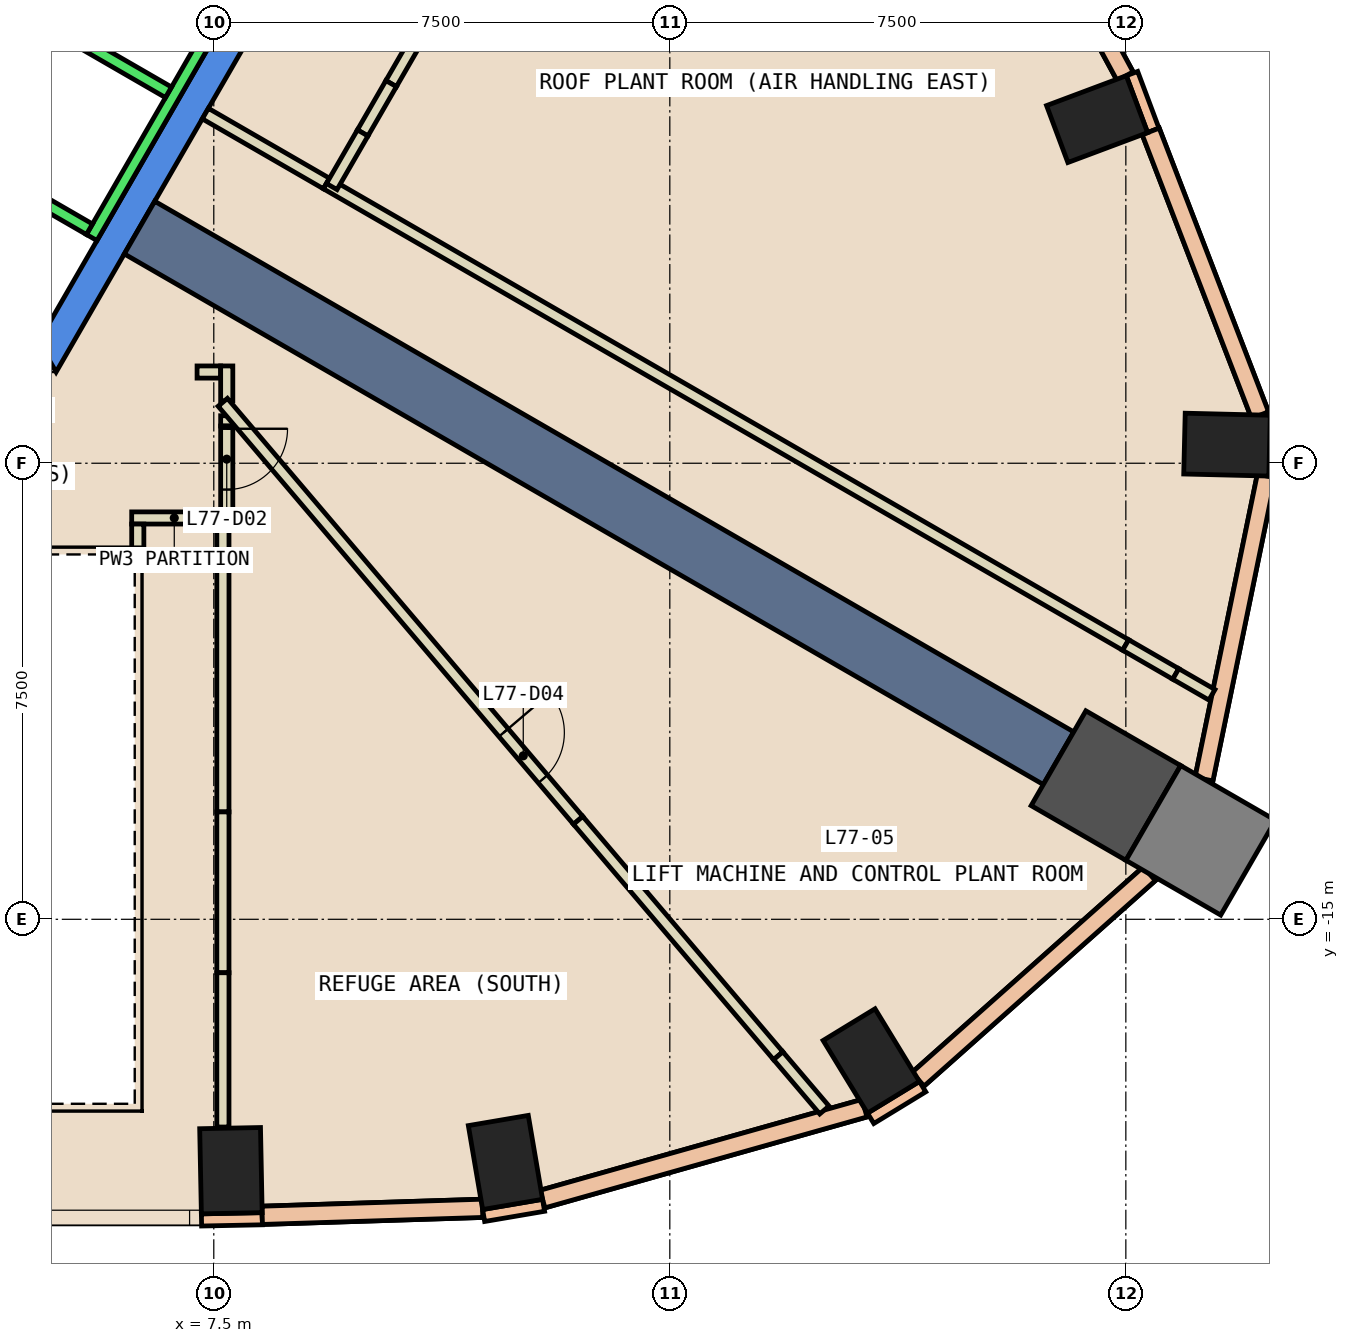
"""IFC4 building model, lengths in metres.
Left out: names, types, materials, properties, quantities, classifications, styles, units other than length and angle.
Written with IfcOpenShell. Run it as: python <this file> out.ifc"""

import sys

from ifc_helpers import new_model, si_unit, direction, frame, frame_2d, origin, origin_2d, place, context, subcontext, project, spatial, polyline, rectangle, outline, extrude, element, fill, save


model = new_model("IFC4")
c1 = context("Model", 3, precision=1e-05, world=origin(), true_north=direction((0.0, 1.0)))
c2 = subcontext(c1, "Body", "Model", "MODEL_VIEW")
j1 = project(units=[si_unit("LENGTHUNIT", "METRE"), si_unit("PLANEANGLEUNIT", "RADIAN")], contexts=[c1])
p1 = place(None, origin())
s1 = spatial("IfcSite", under=j1, at=p1, CompositionType="ELEMENT")
p2 = place(p1, origin())
s2 = spatial("IfcBuilding", under=s1, at=p2, CompositionType="ELEMENT")
p3 = place(p2, frame((0.0, 0.0, 326.0)))
s3 = spatial("IfcBuildingStorey", under=s2, at=p3, CompositionType="ELEMENT", Elevation=326.0)
for number, where, z_axis, x_axis in (
    (1, (7.782, -19.134, -0.6), (0.0, 0.0, 1.0), (1.0, 0.02, 0.0)),
    (2, (12.297, -18.999, -0.6), (0.0, 0.0, 1.0), (0.986, 0.168, 0.0)),
    (3, (18.313, -17.33, -0.6), (0.0, 0.0, 1.0), (0.854, 0.521, 0.0)),
):
    element("IfcColumn", number, at=place(p3, frame(where, z_axis=z_axis, x_axis=x_axis)), inside=s3, PredefinedType="COLUMN", context=c2, shape_type="SweptSolid", body=[
        extrude(rectangle(XDim=1.0, YDim=1.4, at=origin_2d()), origin(), (0.0, 0.0, 1.0), 5.55),
    ])
p4 = place(p3, frame((22.172, -12.801, -0.6), z_axis=(0.0, 0.0, 1.0), x_axis=(-0.866025403784, 0.5, 0.0)))
e4 = element("IfcColumn", 4, at=p4, inside=s3, PredefinedType="COLUMN", context=c2, shape_type="SweptSolid", body=[
    extrude(rectangle(XDim=1.8, YDim=1.8, at=origin_2d()), origin(), (0.0, 0.0, 1.0), 5.55),
])
for number, where, z_axis, x_axis in (
    (5, (24.164, -7.194, -0.6), (0.0, 0.0, 1.0), (0.024, 1.0, 0.0)),
    (6, (22.027, -1.841, -0.6), (0.0, 0.0, 1.0), (-0.351, 0.936, 0.0)),
):
    element("IfcColumn", number, at=place(p3, frame(where, z_axis=z_axis, x_axis=x_axis)), inside=s3, PredefinedType="COLUMN", context=c2, shape_type="SweptSolid", body=[
        extrude(rectangle(XDim=1.0, YDim=1.4, at=origin_2d()), origin(), (0.0, 0.0, 1.0), 5.55),
    ])
p5 = place(p3, frame((23.731, -13.701, -0.6), z_axis=(0.0, 0.0, 1.0), x_axis=(-0.866025403784, 0.5, 0.0)))
e7 = element("IfcColumn", 7, at=p5, inside=s3, PredefinedType="COLUMN", context=c2, shape_type="SweptSolid", body=[
    extrude(rectangle(XDim=1.8, YDim=1.8, at=origin_2d()), origin(), (0.0, 0.0, 1.0), 5.55),
])
p6 = place(p3, frame((0.0, 0.0, -0.6)))
e8 = element("IfcWall", 8, at=p6, inside=s3, PredefinedType="SHEAR", context=c2, shape_type="SweptSolid", body=[
    extrude(outline(polyline([(4.907, -6.0), (9.815, 2.5), (9.238, 2.5), (4.619, -5.5), (4.907, -6.0)])), origin(), (0.0, 0.0, 1.0), 5.55),
])
p7 = place(p3, frame((6.279, -3.625, 0.0), z_axis=(0.0, 0.0, 1.0), x_axis=(0.866025543801, -0.499999757484, 0.0)))
e9 = element("IfcWall", 9, at=p7, inside=s3, PredefinedType="SHEAR", context=c2, shape_type="SweptSolid", body=[
    extrude(rectangle(XDim=17.452, YDim=1.0, at=frame_2d((8.726, 0.0))), origin(), (0.0, 0.0, 1.0), 4.95),
])
p8 = place(p3, frame((22.952, -2.028, 0.0), z_axis=(0.0, 0.0, 1.0), x_axis=(-0.350962844851, 0.936389385637, 0.0)))
e10 = element("IfcWall", 10, at=p8, inside=s3, PredefinedType="STANDARD", context=c2, shape_type="SweptSolid", body=[
    extrude(rectangle(XDim=1.0, YDim=0.2, at=frame_2d((0.5, 0.0))), origin(), (0.0, 0.0, 1.0), 4.95),
])
for number, where, z_axis, x_axis in (
    (11, (7.298, -19.944, 0.0), (0.0, 0.0, 1.0), (1.0, 0.02, 0.0)),
    (12, (11.938, -19.871, 0.0), (0.0, 0.0, 1.0), (0.986, 0.168, 0.0)),
):
    element("IfcWall", number, at=place(p3, frame(where, z_axis=z_axis, x_axis=x_axis)), inside=s3, PredefinedType="STANDARD", context=c2, shape_type="SweptSolid", body=[
        extrude(rectangle(XDim=1.0, YDim=0.2, at=frame_2d((0.5, 0.0))), origin(), (0.0, 0.0, 1.0), 4.95),
    ])
p9 = place(p3, frame((18.303, -18.273, 0.0), z_axis=(0.0, 0.0, 1.0), x_axis=(0.853679739553, 0.520798331677, 0.0)))
e13 = element("IfcWall", 13, at=p9, inside=s3, PredefinedType="STANDARD", context=c2, shape_type="SweptSolid", body=[
    extrude(rectangle(XDim=1.0, YDim=0.2, at=frame_2d((0.5, 0.0))), origin(), (0.0, 0.0, 1.0), 4.95),
])
p10 = place(p3, frame((24.952, -7.713, 0.0), z_axis=(0.0, 0.0, 1.0), x_axis=(0.024192379573, 0.999707321555, 0.0)))
e14 = element("IfcWall", 14, at=p10, inside=s3, PredefinedType="STANDARD", context=c2, shape_type="SweptSolid", body=[
    extrude(rectangle(XDim=0.999, YDim=0.2, at=frame_2d((0.5, 0.0))), origin(), (0.0, 0.0, 1.0), 4.95),
])
p11 = place(p3, frame((8.296, -19.868, 0.0), z_axis=(0.0, 0.0, 1.0), x_axis=(0.9994967126, 0.031722570865, 0.0)))
e15 = element("IfcWall", 15, at=p11, inside=s3, PredefinedType="STANDARD", context=c2, shape_type="SweptSolid", body=[
    extrude(rectangle(XDim=3.625, YDim=0.3, at=frame_2d((1.812, 0.0))), origin(), (0.0, 0.0, 1.0), 1.2),
])
p12 = place(p3, frame((8.296, -19.868, 4.15), z_axis=(0.0, 0.0, 1.0), x_axis=(0.9994967126, 0.031722570865, 0.0)))
e16 = element("IfcWall", 16, at=p12, inside=s3, PredefinedType="STANDARD", context=c2, shape_type="SweptSolid", body=[
    extrude(rectangle(XDim=3.625, YDim=0.3, at=frame_2d((1.812, 0.0))), origin(), (0.0, 0.0, 1.0), 0.8),
])
p13 = place(p3, frame((12.906, -19.601, 0.0), z_axis=(0.0, 0.0, 1.0), x_axis=(0.962383071313, 0.271696198079, 0.0)))
e17 = element("IfcWall", 17, at=p13, inside=s3, PredefinedType="STANDARD", context=c2, shape_type="SweptSolid", body=[
    extrude(rectangle(XDim=5.503, YDim=0.3, at=frame_2d((2.751, 0.0))), origin(), (0.0, 0.0, 1.0), 1.2),
])
p14 = place(p3, frame((12.906, -19.601, 4.15), z_axis=(0.0, 0.0, 1.0), x_axis=(0.962383071313, 0.271696198079, 0.0)))
e18 = element("IfcWall", 18, at=p14, inside=s3, PredefinedType="STANDARD", context=c2, shape_type="SweptSolid", body=[
    extrude(rectangle(XDim=5.503, YDim=0.3, at=frame_2d((2.751, 0.0))), origin(), (0.0, 0.0, 1.0), 0.8),
])
p15 = place(p3, frame((19.082, -17.631, 0.0), z_axis=(0.0, 0.0, 1.0), x_axis=(0.74752312802, 0.664235781236, 0.0)))
e19 = element("IfcWall", 19, at=p15, inside=s3, PredefinedType="STANDARD", context=c2, shape_type="SweptSolid", body=[
    extrude(rectangle(XDim=5.089, YDim=0.3, at=frame_2d((2.544, 0.0))), origin(), (0.0, 0.0, 1.0), 1.2),
])
p16 = place(p3, frame((19.082, -17.631, 4.15), z_axis=(0.0, 0.0, 1.0), x_axis=(0.74752312802, 0.664235781236, 0.0)))
e20 = element("IfcWall", 20, at=p16, inside=s3, PredefinedType="STANDARD", context=c2, shape_type="SweptSolid", body=[
    extrude(rectangle(XDim=5.089, YDim=0.3, at=frame_2d((2.544, 0.0))), origin(), (0.0, 0.0, 1.0), 0.8),
])
p17 = place(p3, frame((23.785, -12.694, 0.0), z_axis=(0.0, 0.0, 1.0), x_axis=(0.201426878117, 0.979503554242, 0.0)))
e21 = element("IfcWall", 21, at=p17, inside=s3, PredefinedType="STANDARD", context=c2, shape_type="SweptSolid", body=[
    extrude(rectangle(XDim=5.089, YDim=0.3, at=frame_2d((2.545, 0.0))), origin(), (0.0, 0.0, 1.0), 1.2),
])
p18 = place(p3, frame((23.785, -12.694, 4.15), z_axis=(0.0, 0.0, 1.0), x_axis=(0.201426878117, 0.979503554242, 0.0)))
e22 = element("IfcWall", 22, at=p18, inside=s3, PredefinedType="STANDARD", context=c2, shape_type="SweptSolid", body=[
    extrude(rectangle(XDim=5.089, YDim=0.3, at=frame_2d((2.545, 0.0))), origin(), (0.0, 0.0, 1.0), 0.8),
])
p19 = place(p3, frame((24.707, -6.708, 0.0), z_axis=(0.0, 0.0, 1.0), x_axis=(-0.35964980127, 0.933087359493, 0.0)))
e23 = element("IfcWall", 23, at=p19, inside=s3, PredefinedType="STANDARD", context=c2, shape_type="SweptSolid", body=[
    extrude(rectangle(XDim=5.0, YDim=0.3, at=frame_2d((2.5, 0.0))), origin(), (0.0, 0.0, 1.0), 1.2),
])
p20 = place(p3, frame((24.707, -6.708, 4.15), z_axis=(0.0, 0.0, 1.0), x_axis=(-0.35964980127, 0.933087359493, 0.0)))
e24 = element("IfcWall", 24, at=p20, inside=s3, PredefinedType="STANDARD", context=c2, shape_type="SweptSolid", body=[
    extrude(rectangle(XDim=5.0, YDim=0.3, at=frame_2d((2.5, 0.0))), origin(), (0.0, 0.0, 1.0), 0.8),
])
p21 = place(p3, frame((22.488, -1.135, 0.0), z_axis=(0.0, 0.0, 1.0), x_axis=(-0.476794367741, 0.879014863862, 0.0)))
e25 = element("IfcWall", 25, at=p21, inside=s3, PredefinedType="STANDARD", context=c2, shape_type="SweptSolid", body=[
    extrude(rectangle(XDim=7.553, YDim=0.3, at=frame_2d((3.776, 0.0))), origin(), (0.0, 0.0, 1.0), 1.2),
])
p22 = place(p3, frame((22.488, -1.135, 4.15), z_axis=(0.0, 0.0, 1.0), x_axis=(-0.476794367741, 0.879014863862, 0.0)))
e26 = element("IfcWall", 26, at=p22, inside=s3, PredefinedType="STANDARD", context=c2, shape_type="SweptSolid", body=[
    extrude(rectangle(XDim=7.553, YDim=0.3, at=frame_2d((3.776, 0.0))), origin(), (0.0, 0.0, 1.0), 0.8),
])
p23 = place(p3, frame((7.55, -8.4, 0.0), z_axis=(0.0, 0.0, 1.0), x_axis=(-1.0, 0.0, 0.0)))
e27 = element("IfcWall", 27, at=p23, inside=s3, PredefinedType="PARTITIONING", context=c2, shape_type="SweptSolid", body=[
    extrude(rectangle(XDim=1.4, YDim=0.2, at=frame_2d((0.7, 0.0))), origin(), (0.0, 0.0, 1.0), 4.95),
])
p24 = place(p3, frame((6.25, -8.5, 0.0), z_axis=(0.0, 0.0, 1.0), x_axis=(0.0, -1.0, 0.0)))
e28 = element("IfcWall", 28, at=p24, inside=s3, PredefinedType="PARTITIONING", context=c2, shape_type="SweptSolid", body=[
    extrude(rectangle(XDim=0.45, YDim=0.2, at=frame_2d((0.225, 0.0))), origin(), (0.0, 0.0, 1.0), 4.95),
])
p25 = place(p3, frame((7.713, -6.719, 0.0), z_axis=(0.0, 0.0, 1.0), x_axis=(0.0, -1.0, 0.0)))
e29 = element("IfcWall", 29, at=p25, inside=s3, PredefinedType="PARTITIONING", context=c2, shape_type="SweptSolid", body=[
    extrude(rectangle(XDim=0.169, YDim=0.2, at=frame_2d((0.084, 0.0))), origin(), (0.0, 0.0, 1.0), 2.55),
])
p26 = place(p3, frame((7.225, -6.0, 0.0), z_axis=(0.0, 0.0, 1.0), x_axis=(1.0, 0.0, 0.0)))
e30 = element("IfcWall", 30, at=p26, inside=s3, PredefinedType="PARTITIONING", context=c2, shape_type="SweptSolid", body=[
    extrude(rectangle(XDim=0.388, YDim=0.2, at=frame_2d((0.194, 0.0))), origin(), (0.0, 0.0, 1.0), 2.55),
])
p27 = place(p3, frame((7.713, -5.9, 0.0), z_axis=(0.0, 0.0, 1.0), x_axis=(0.0, -1.0, 0.0)))
e31 = element("IfcWall", 31, at=p27, inside=s3, PredefinedType="PARTITIONING", context=c2, shape_type="SweptSolid", body=[
    extrude(rectangle(XDim=0.574, YDim=0.2, at=frame_2d((0.287, 0.0))), origin(), (0.0, 0.0, 1.0), 2.55),
])
p28 = place(p3, frame((7.65, -8.5, 0.0), z_axis=(0.0, 0.0, 1.0), x_axis=(0.0, -1.0, 0.0)))
e32 = element("IfcWall", 32, at=p28, inside=s3, PredefinedType="PARTITIONING", context=c2, shape_type="SweptSolid", body=[
    extrude(rectangle(XDim=4.734, YDim=0.2, at=frame_2d((2.367, 0.0))), origin(), (0.0, 0.0, 1.0), 4.95),
])
p29 = place(p3, frame((7.648, -6.498, 0.0), z_axis=(0.0, 0.0, 1.0), x_axis=(0.647664127958, -0.761925965798, 0.0)))
e33 = element("IfcWall", 33, at=p29, inside=s3, PredefinedType="PARTITIONING", context=c2, shape_type="SweptSolid", body=[
    extrude(rectangle(XDim=9.023, YDim=0.2, at=frame_2d((4.512, 0.0))), origin(), (0.0, 0.0, 1.0), 2.55),
])
p30 = place(p29, frame((7.13, 0.0, 0.0)))
e34 = element("IfcOpeningElement", 34, at=p30, cuts=e33, PredefinedType="OPENING", context=c2, shape_type="SweptSolid", body=[
    extrude(rectangle(XDim=1.0, YDim=2.1, at=frame_2d((0.5, 1.05))), frame((0.0, 0.11, 0.0), z_axis=(0.0, -1.0, 0.0), x_axis=(1.0, 0.0, 0.0)), (0.0, 0.0, 1.0), 0.22),
])
p31 = place(p3, frame((7.361, -1.75, 0.0), z_axis=(0.0, 0.0, 1.0), x_axis=(0.866053019151, -0.499952165731, 0.0)))
e35 = element("IfcWall", 35, at=p31, inside=s3, PredefinedType="PARTITIONING", context=c2, shape_type="SweptSolid", body=[
    extrude(rectangle(XDim=2.3, YDim=0.2, at=frame_2d((1.15, 0.0))), origin(), (0.0, 0.0, 1.0), 4.95),
])
p32 = place(p3, frame((9.353, -2.9, 0.0), z_axis=(0.0, 0.0, 1.0), x_axis=(0.866014146277, -0.500019498068, 0.0)))
e36 = element("IfcWall", 36, at=p32, inside=s3, PredefinedType="PARTITIONING", context=c2, shape_type="SweptSolid", body=[
    extrude(rectangle(XDim=15.178, YDim=0.2, at=frame_2d((7.589, 0.0))), origin(), (0.0, 0.0, 1.0), 4.95),
])
p33 = place(p3, frame((7.713, -6.888, 0.0), z_axis=(0.0, 0.0, 1.0), x_axis=(0.0, -1.0, 0.0)))
e37 = element("IfcWall", 37, at=p33, inside=s3, PredefinedType="PARTITIONING", context=c2, shape_type="SweptSolid", body=[
    extrude(rectangle(XDim=1.612, YDim=0.2, at=frame_2d((0.806, 0.0))), origin(), (0.0, 0.0, 1.0), 4.95),
])
p34 = place(p33, frame((0.045, 0.0, 0.0)))
e38 = element("IfcOpeningElement", 38, at=p34, cuts=e37, PredefinedType="OPENING", context=c2, shape_type="SweptSolid", body=[
    extrude(rectangle(XDim=1.0, YDim=2.1, at=frame_2d((0.5, 1.05))), frame((0.0, 0.11, 0.0), z_axis=(0.0, -1.0, 0.0), x_axis=(1.0, 0.0, 0.0)), (0.0, 0.0, 1.0), 0.22),
])
p35 = place(p3, frame((7.65, -13.234, 0.0), z_axis=(0.0, 0.0, 1.0), x_axis=(0.0, -1.0, 0.0)))
e39 = element("IfcWall", 39, at=p35, inside=s3, PredefinedType="PARTITIONING", context=c2, shape_type="SweptSolid", body=[
    extrude(rectangle(XDim=2.645, YDim=0.2, at=frame_2d((1.323, 0.0))), origin(), (0.0, 0.0, 1.0), 2.55),
])
p36 = place(p3, frame((7.65, -15.879, 0.0), z_axis=(0.0, 0.0, 1.0), x_axis=(0.0, -1.0, 0.0)))
e40 = element("IfcWall", 40, at=p36, inside=s3, PredefinedType="PARTITIONING", context=c2, shape_type="SweptSolid", body=[
    extrude(rectangle(XDim=2.537, YDim=0.2, at=frame_2d((1.269, 0.0))), origin(), (0.0, 0.0, 1.0), 4.95),
])
p37 = place(p3, frame((13.492, -13.373, 0.0), z_axis=(0.0, 0.0, 1.0), x_axis=(0.647739079398, -0.761862248061, 0.0)))
e41 = element("IfcWall", 41, at=p37, inside=s3, PredefinedType="PARTITIONING", context=c2, shape_type="SweptSolid", body=[
    extrude(rectangle(XDim=5.081, YDim=0.2, at=frame_2d((2.541, 0.0))), origin(), (0.0, 0.0, 1.0), 4.95),
])
p38 = place(p3, frame((16.783, -17.244, 0.0), z_axis=(0.0, 0.0, 1.0), x_axis=(0.648023463551, -0.761620371765, 0.0)))
e42 = element("IfcWall", 42, at=p38, inside=s3, PredefinedType="PARTITIONING", context=c2, shape_type="SweptSolid", body=[
    extrude(rectangle(XDim=1.171, YDim=0.2, at=frame_2d((0.586, 0.0))), origin(), (0.0, 0.0, 1.0), 2.55),
])
p39 = place(p3, frame((22.497, -10.489, 0.0), z_axis=(0.0, 0.0, 1.0), x_axis=(0.865865073245, -0.500277597875, 0.0)))
e43 = element("IfcWall", 43, at=p39, inside=s3, PredefinedType="PARTITIONING", context=c2, shape_type="SweptSolid", body=[
    extrude(rectangle(XDim=0.952, YDim=0.2, at=frame_2d((0.476, 0.0))), origin(), (0.0, 0.0, 1.0), 2.55),
])
p40 = place(p3, frame((23.321, -10.965, 0.0), z_axis=(0.0, 0.0, 1.0), x_axis=(0.866333505267, -0.499465972466, 0.0)))
e44 = element("IfcWall", 44, at=p40, inside=s3, PredefinedType="PARTITIONING", context=c2, shape_type="SweptSolid", body=[
    extrude(rectangle(XDim=0.687, YDim=0.2, at=frame_2d((0.343, 0.0))), origin(), (0.0, 0.0, 1.0), 4.95),
])
p41 = place(p3, frame((11.632, 0.847, 0.0), z_axis=(0.0, 0.0, 1.0), x_axis=(-0.500105155565, -0.865964683678, 0.0)))
e45 = element("IfcWall", 45, at=p41, inside=s3, PredefinedType="PARTITIONING", context=c2, shape_type="SweptSolid", body=[
    extrude(rectangle(XDim=2.43, YDim=0.2, at=frame_2d((1.215, 0.0))), origin(), (0.0, 0.0, 1.0), 4.95),
])
p42 = place(p3, frame((10.417, -1.257, 0.0), z_axis=(0.0, 0.0, 1.0), x_axis=(-0.499812735651, -0.866133493915, 0.0)))
e46 = element("IfcWall", 46, at=p42, inside=s3, PredefinedType="PARTITIONING", context=c2, shape_type="SweptSolid", body=[
    extrude(rectangle(XDim=0.936, YDim=0.2, at=frame_2d((0.468, 0.0))), origin(), (0.0, 0.0, 1.0), 2.55),
])
p43 = place(p3, frame((9.949, -2.068, 0.0), z_axis=(0.0, 0.0, 1.0), x_axis=(-0.499930013145, -0.866065806944, 0.0)))
e47 = element("IfcWall", 47, at=p43, inside=s3, PredefinedType="PARTITIONING", context=c2, shape_type="SweptSolid", body=[
    extrude(rectangle(XDim=1.018, YDim=0.2, at=frame_2d((0.509, 0.0))), origin(), (0.0, 0.0, 1.0), 4.95),
])
p44 = place(p3, frame((3.24, -2.488, 0.0), z_axis=(0.0, 0.0, 1.0), x_axis=(0.500034260056, 0.866005622828, 0.0)))
e48 = element("IfcWall", 48, at=p44, inside=s3, PredefinedType="STANDARD", context=c2, shape_type="SweptSolid", body=[
    extrude(rectangle(XDim=5.399, YDim=0.2, at=frame_2d((2.7, 0.0))), origin(), (0.0, 0.0, 1.0), 4.95),
])
p45 = place(p44, frame((3.225, 0.0, 0.0)))
e49 = element("IfcOpeningElement", 49, at=p45, cuts=e48, PredefinedType="OPENING", context=c2, shape_type="SweptSolid", body=[
    extrude(rectangle(XDim=1.1, YDim=2.1, at=frame_2d((0.55, 1.05))), frame((0.0, 0.11, 0.0), z_axis=(0.0, -1.0, 0.0), x_axis=(1.0, 0.0, 0.0)), (0.0, 0.0, 1.0), 0.22),
])
p46 = place(p44, frame((1.225, 0.0, 0.0)))
e50 = element("IfcOpeningElement", 50, at=p46, cuts=e48, PredefinedType="OPENING", context=c2, shape_type="SweptSolid", body=[
    extrude(rectangle(XDim=1.1, YDim=2.1, at=frame_2d((0.55, 1.05))), frame((0.0, 0.11, 0.0), z_axis=(0.0, -1.0, 0.0), x_axis=(1.0, 0.0, 0.0)), (0.0, 0.0, 1.0), 0.22),
])
p47 = place(p3, frame((5.492, -3.788, 0.0), z_axis=(0.0, 0.0, 1.0), x_axis=(0.500034260056, 0.866005622828, 0.0)))
e51 = element("IfcWall", 51, at=p47, inside=s3, PredefinedType="STANDARD", context=c2, shape_type="SweptSolid", body=[
    extrude(rectangle(XDim=5.399, YDim=0.2, at=frame_2d((2.7, 0.0))), origin(), (0.0, 0.0, 1.0), 4.95),
])
p48 = place(p3, frame((3.377, -2.452, 0.0), z_axis=(0.0, 0.0, 1.0), x_axis=(0.865955154139, -0.50012165622, 0.0)))
e52 = element("IfcWall", 52, at=p48, inside=s3, PredefinedType="STANDARD", context=c2, shape_type="SweptSolid", body=[
    extrude(rectangle(XDim=2.4, YDim=0.2, at=frame_2d((1.2, 0.0))), origin(), (0.0, 0.0, 1.0), 4.95),
])
p49 = place(p3, frame((4.677, -0.2, 0.0), z_axis=(0.0, 0.0, 1.0), x_axis=(0.865973769406, -0.500089422704, 0.0)))
e53 = element("IfcWall", 53, at=p49, inside=s3, PredefinedType="STANDARD", context=c2, shape_type="SweptSolid", body=[
    extrude(rectangle(XDim=2.399, YDim=0.2, at=frame_2d((1.2, 0.0))), origin(), (0.0, 0.0, 1.0), 4.95),
])
p50 = place(p34, origin())
e54 = element("IfcDoor", 54, at=p50, inside=s3, OperationType="SINGLE_SWING_LEFT", PredefinedType="DOOR", context=c2, shape_type="SweptSolid", body=[
    extrude(rectangle(XDim=1.0, YDim=2.1, at=frame_2d((0.5, 1.05))), frame((0.0, 0.025, 0.0), z_axis=(0.0, -1.0, 0.0), x_axis=(1.0, 0.0, 0.0)), (0.0, 0.0, 1.0), 0.05),
])
fill(e38, e54)
p51 = place(p30, origin())
e55 = element("IfcDoor", 55, at=p51, inside=s3, OperationType="SINGLE_SWING_LEFT", PredefinedType="DOOR", context=c2, shape_type="SweptSolid", body=[
    extrude(rectangle(XDim=1.0, YDim=2.1, at=frame_2d((0.5, 1.05))), frame((0.0, 0.025, 0.0), z_axis=(0.0, -1.0, 0.0), x_axis=(1.0, 0.0, 0.0)), (0.0, 0.0, 1.0), 0.05),
])
fill(e34, e55)
save(model, sys.argv[1])
